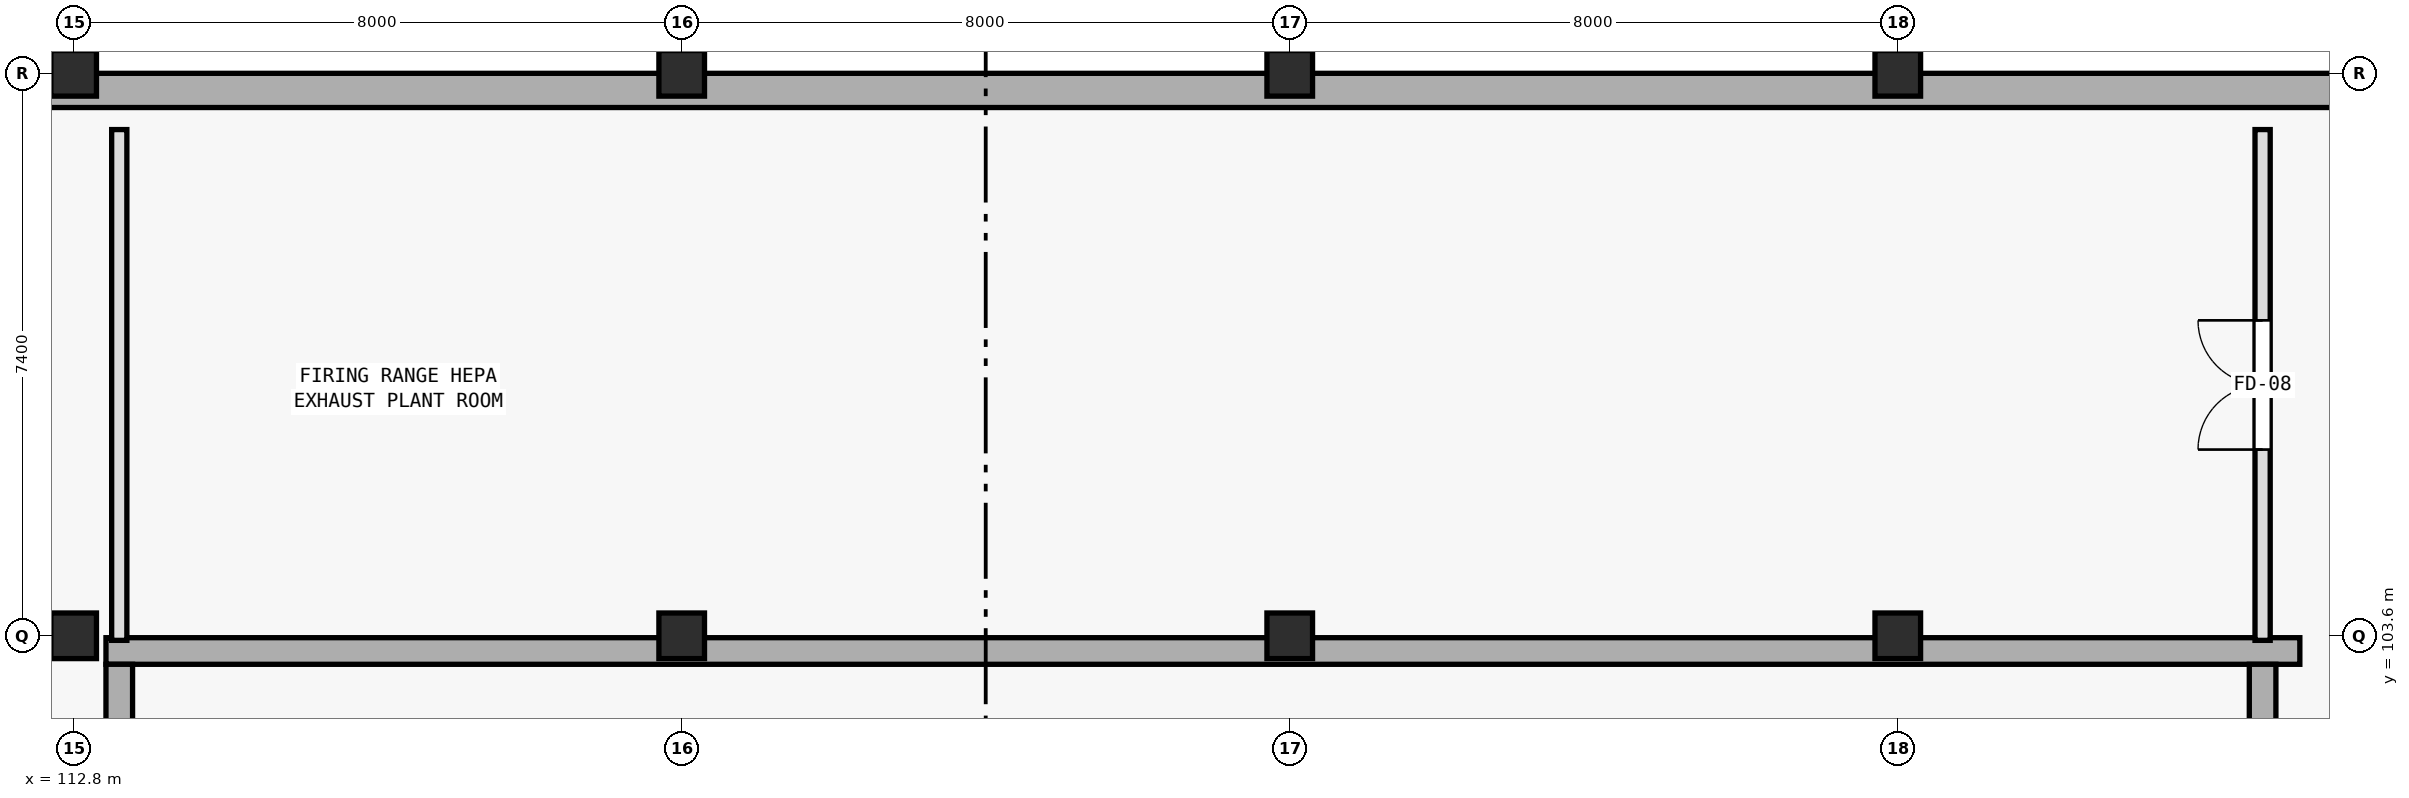
"""IFC4 building model, lengths in metres.
Left out: names, types, materials, properties, quantities, classifications, styles, units other than length and angle.
Written with IfcOpenShell. Run it as: python <this file> out.ifc"""

import sys

from ifc_helpers import new_model, si_unit, direction, frame, frame_2d, origin, origin_2d, place, context, subcontext, project, spatial, rectangle, extrude, element, fill, save


model = new_model("IFC4")
c1 = context("Model", 3, precision=1e-05, world=origin(), true_north=direction((0.0, 1.0)))
c2 = subcontext(c1, "Body", "Model", "MODEL_VIEW")
j1 = project(units=[si_unit("LENGTHUNIT", "METRE"), si_unit("PLANEANGLEUNIT", "RADIAN")], contexts=[c1])
p1 = place(None, origin())
s1 = spatial("IfcSite", under=j1, at=p1, CompositionType="ELEMENT")
p2 = place(p1, origin())
s2 = spatial("IfcBuilding", under=s1, at=p2, CompositionType="ELEMENT")
p3 = place(p2, frame((0.0, 0.0, -4.8)))
s3 = spatial("IfcBuildingStorey", under=s2, at=p3, CompositionType="ELEMENT", Elevation=-4.8)
p4 = place(p3, frame((104.8, 110.775, 0.0), z_axis=(0.0, 0.0, 1.0), x_axis=(1.0, 0.0, 0.0)))
e1 = element("IfcWall", 1, at=p4, inside=s3, PredefinedType="SOLIDWALL", context=c2, shape_type="SweptSolid", body=[
    extrude(rectangle(XDim=48.0, YDim=0.45, at=frame_2d((24.0, 0.0))), origin(), (0.0, 0.0, 1.0), 4.38),
])
for number, where, z_axis, x_axis in (
    (2, (112.8, 103.6, 0.0), (0.0, 0.0, 1.0), (1.0, 0.0, 0.0)),
    (3, (112.8, 111.0, 0.0), (0.0, 0.0, 1.0), (1.0, 0.0, 0.0)),
    (4, (120.8, 103.6, 0.0), (0.0, 0.0, 1.0), (1.0, 0.0, 0.0)),
    (5, (120.8, 111.0, 0.0), (0.0, 0.0, 1.0), (1.0, 0.0, 0.0)),
    (6, (128.8, 103.6, 0.0), (0.0, 0.0, 1.0), (1.0, 0.0, 0.0)),
    (7, (128.8, 111.0, 0.0), (0.0, 0.0, 1.0), (1.0, 0.0, 0.0)),
    (8, (136.8, 103.6, 0.0), (0.0, 0.0, 1.0), (1.0, 0.0, 0.0)),
    (9, (136.8, 111.0, 0.0), (0.0, 0.0, 1.0), (1.0, 0.0, 0.0)),
):
    element("IfcColumn", number, at=place(p3, frame(where, z_axis=z_axis, x_axis=x_axis)), inside=s3, PredefinedType="COLUMN", context=c2, shape_type="SweptSolid", body=[
        extrude(rectangle(XDim=0.6, YDim=0.6, at=origin_2d()), origin(), (0.0, 0.0, 1.0), 4.8),
    ])
p5 = place(p3, frame((113.225, 103.4, 0.0), z_axis=(0.0, 0.0, 1.0), x_axis=(1.0, 0.0, 0.0)))
e10 = element("IfcWall", 10, at=p5, inside=s3, PredefinedType="SOLIDWALL", context=c2, shape_type="SweptSolid", body=[
    extrude(rectangle(XDim=28.865, YDim=0.35, at=frame_2d((14.433, 0.0))), origin(), (0.0, 0.0, 1.0), 3.51),
])
p6 = place(p3, frame((113.4, 74.175, 0.0), z_axis=(0.0, 0.0, 1.0), x_axis=(0.0, 1.0, 0.0)))
e11 = element("IfcWall", 11, at=p6, inside=s3, PredefinedType="SOLIDWALL", context=c2, shape_type="SweptSolid", body=[
    extrude(rectangle(XDim=29.05, YDim=0.35, at=frame_2d((14.525, 0.0))), origin(), (0.0, 0.0, 1.0), 3.51),
])
p7 = place(p3, frame((141.6, 74.175, 0.0), z_axis=(0.0, 0.0, 1.0), x_axis=(0.0, 1.0, 0.0)))
e12 = element("IfcWall", 12, at=p7, inside=s3, PredefinedType="SOLIDWALL", context=c2, shape_type="SweptSolid", body=[
    extrude(rectangle(XDim=29.05, YDim=0.35, at=frame_2d((14.525, 0.0))), origin(), (0.0, 0.0, 1.0), 3.51),
])
p8 = place(p7, frame((13.85, 0.0, 0.0)))
e13 = element("IfcOpeningElement", 13, at=p8, cuts=e12, PredefinedType="OPENING", context=c2, shape_type="SweptSolid", body=[
    extrude(rectangle(XDim=1.35, YDim=2.25, at=frame_2d((0.675, 1.125))), frame((0.0, 0.185, 0.0), z_axis=(0.0, -1.0, 0.0), x_axis=(1.0, 0.0, 0.0)), (0.0, 0.0, 1.0), 0.37),
])
p9 = place(p3, frame((113.4, 103.54, 0.0), z_axis=(0.0, 0.0, 1.0), x_axis=(0.0, 1.0, 0.0)))
e14 = element("IfcWall", 14, at=p9, inside=s3, PredefinedType="STANDARD", context=c2, shape_type="SweptSolid", body=[
    extrude(rectangle(XDim=6.72, YDim=0.2, at=frame_2d((3.36, 0.0))), origin(), (0.0, 0.0, 1.0), 3.51),
])
p10 = place(p3, frame((141.6, 103.54, 0.0), z_axis=(0.0, 0.0, 1.0), x_axis=(0.0, 1.0, 0.0)))
e15 = element("IfcWall", 15, at=p10, inside=s3, PredefinedType="STANDARD", context=c2, shape_type="SweptSolid", body=[
    extrude(rectangle(XDim=6.72, YDim=0.2, at=frame_2d((3.36, 0.0))), origin(), (0.0, 0.0, 1.0), 4.38),
])
p11 = place(p10, frame((2.51, 0.0, 0.0)))
e16 = element("IfcOpeningElement", 16, at=p11, cuts=e15, PredefinedType="OPENING", context=c2, shape_type="SweptSolid", body=[
    extrude(rectangle(XDim=1.7, YDim=2.4, at=frame_2d((0.85, 1.2))), frame((0.0, 0.11, 0.0), z_axis=(0.0, -1.0, 0.0), x_axis=(1.0, 0.0, 0.0)), (0.0, 0.0, 1.0), 0.22),
])
p12 = place(p11, origin())
e17 = element("IfcDoor", 17, at=p12, inside=s3, OperationType="DOUBLE_DOOR_SINGLE_SWING", PredefinedType="DOOR", context=c2, shape_type="SweptSolid", body=[
    extrude(rectangle(XDim=1.7, YDim=2.4, at=frame_2d((0.85, 1.2))), frame((0.0, 0.025, 0.0), z_axis=(0.0, -1.0, 0.0), x_axis=(1.0, 0.0, 0.0)), (0.0, 0.0, 1.0), 0.05),
])
fill(e16, e17)
save(model, sys.argv[1])
